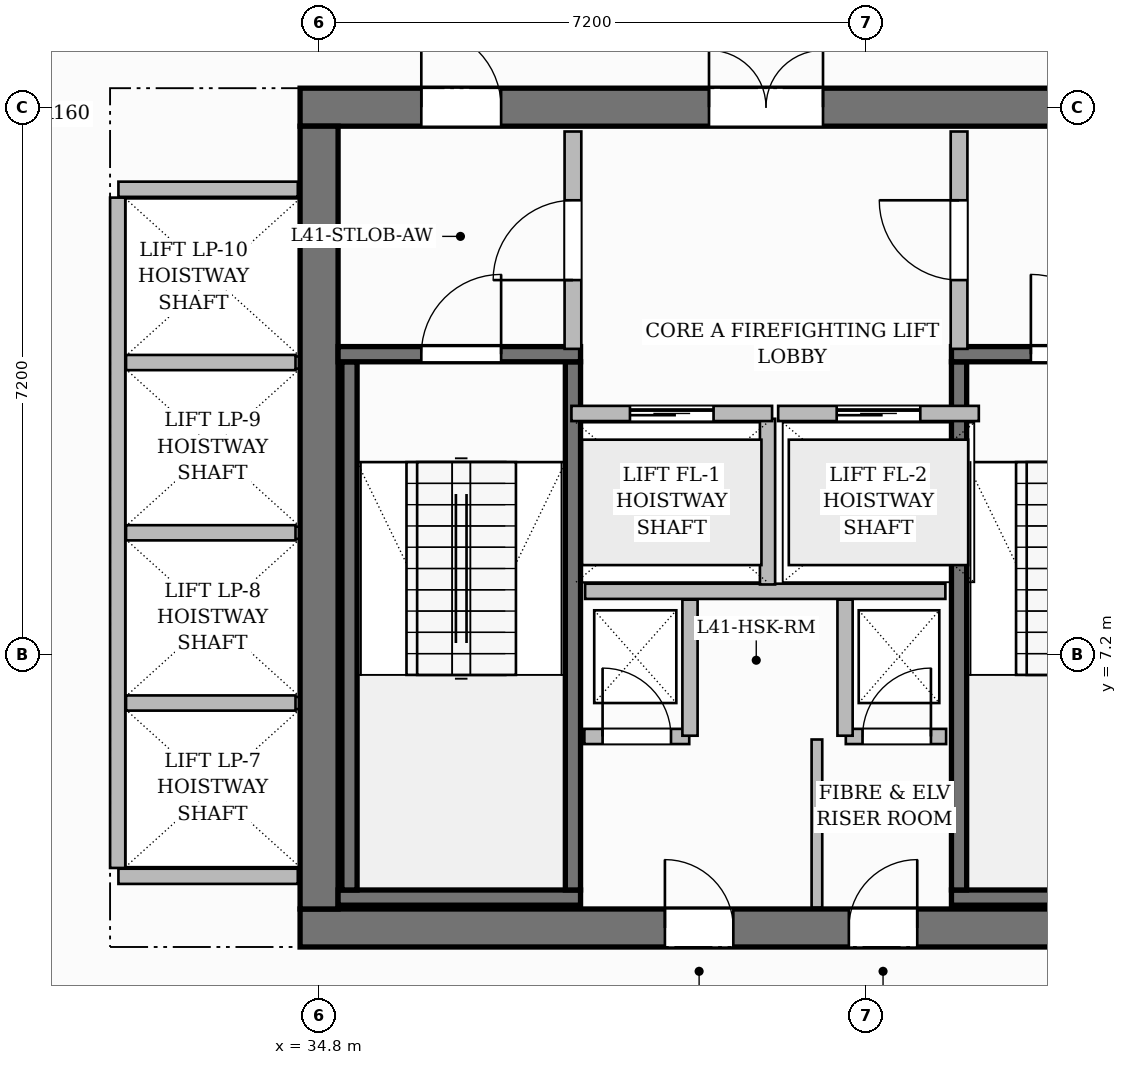
"""IFC4 building model, lengths in metres.
Left out: names, types, materials, properties, quantities, classifications, styles, units other than length and angle.
Written with IfcOpenShell. Run it as: python <this file> out.ifc"""

import sys

from ifc_helpers import new_model, si_unit, direction, frame, frame_2d, origin, place, context, subcontext, project, spatial, rectangle, extrude, source, transform, mapped, element, fill, save


model = new_model("IFC4")
c1 = context("Model", 3, precision=1e-05, world=origin(), true_north=direction((0.0, 1.0)))
c2 = subcontext(c1, "Body", "Model", "MODEL_VIEW")
j1 = project(units=[si_unit("LENGTHUNIT", "METRE"), si_unit("PLANEANGLEUNIT", "RADIAN")], contexts=[c1])
p1 = place(None, origin())
s1 = spatial("IfcSite", under=j1, at=p1, CompositionType="ELEMENT")
p2 = place(p1, origin())
s2 = spatial("IfcBuilding", under=s1, at=p2, CompositionType="ELEMENT")
p3 = place(p2, frame((0.0, 0.0, 165.7)))
s3 = spatial("IfcBuildingStorey", under=s2, at=p3, CompositionType="ELEMENT", Elevation=165.7)
p4 = place(p3, frame((34.55, 3.6, 0.0), z_axis=(0.0, 0.0, 1.0), x_axis=(1.0, 0.0, 0.0)))
e1 = element("IfcWall", 1, at=p4, inside=s3, PredefinedType="SHEAR", context=c2, shape_type="SweptSolid", body=[
    extrude(rectangle(XDim=15.5, YDim=0.5, at=frame_2d((7.75, 0.0))), origin(), (0.0, 0.0, 1.0), 3.85),
])
p5 = place(p4, frame((4.8, 0.0, 0.0)))
e2 = element("IfcOpeningElement", 2, at=p5, cuts=e1, PredefinedType="OPENING", context=c2, shape_type="SweptSolid", body=[
    extrude(rectangle(XDim=0.9, YDim=2.1, at=frame_2d((0.45, 1.05))), frame((0.0, 0.26, 0.0), z_axis=(0.0, -1.0, 0.0), x_axis=(1.0, 0.0, 0.0)), (0.0, 0.0, 1.0), 0.52),
])
p6 = place(p4, frame((7.22, 0.0, 0.0)))
e3 = element("IfcOpeningElement", 3, at=p6, cuts=e1, PredefinedType="OPENING", context=c2, shape_type="SweptSolid", body=[
    extrude(rectangle(XDim=0.9, YDim=2.1, at=frame_2d((0.45, 1.05))), frame((0.0, 0.26, 0.0), z_axis=(0.0, -1.0, 0.0), x_axis=(1.0, 0.0, 0.0)), (0.0, 0.0, 1.0), 0.52),
])
p7 = place(p3, frame((34.55, 14.4, 0.0), z_axis=(0.0, 0.0, 1.0), x_axis=(1.0, 0.0, 0.0)))
e4 = element("IfcWall", 4, at=p7, inside=s3, PredefinedType="SHEAR", context=c2, shape_type="SweptSolid", body=[
    extrude(rectangle(XDim=15.5, YDim=0.5, at=frame_2d((7.75, 0.0))), origin(), (0.0, 0.0, 1.0), 3.85),
])
p8 = place(p7, frame((5.38, 0.0, 0.0)))
e5 = element("IfcOpeningElement", 5, at=p8, cuts=e4, PredefinedType="OPENING", context=c2, shape_type="SweptSolid", body=[
    extrude(rectangle(XDim=1.5, YDim=2.2, at=frame_2d((0.75, 1.1))), frame((0.0, 0.26, 0.0), z_axis=(0.0, -1.0, 0.0), x_axis=(1.0, 0.0, 0.0)), (0.0, 0.0, 1.0), 0.52),
])
p9 = place(p7, frame((1.595, 0.0, 0.0)))
e6 = element("IfcOpeningElement", 6, at=p9, cuts=e4, PredefinedType="OPENING", context=c2, shape_type="SweptSolid", body=[
    extrude(rectangle(XDim=1.05, YDim=2.15, at=frame_2d((0.525, 1.075))), frame((0.0, 0.26, 0.0), z_axis=(0.0, -1.0, 0.0), x_axis=(1.0, 0.0, 0.0)), (0.0, 0.0, 1.0), 0.52),
])
p10 = place(p7, frame((11.225, 0.0, 0.0)))
e7 = element("IfcOpeningElement", 7, at=p10, cuts=e4, PredefinedType="OPENING", context=c2, shape_type="SweptSolid", body=[
    extrude(rectangle(XDim=1.05, YDim=2.15, at=frame_2d((0.525, 1.075))), frame((0.0, 0.26, 0.0), z_axis=(0.0, -1.0, 0.0), x_axis=(1.0, 0.0, 0.0)), (0.0, 0.0, 1.0), 0.52),
])
p11 = place(p3, frame((34.8, 3.85, 0.0), z_axis=(0.0, 0.0, 1.0), x_axis=(0.0, 1.0, 0.0)))
e8 = element("IfcWall", 8, at=p11, inside=s3, PredefinedType="SHEAR", context=c2, shape_type="SweptSolid", body=[
    extrude(rectangle(XDim=10.3, YDim=0.5, at=frame_2d((5.15, 0.0))), origin(), (0.0, 0.0, 1.0), 3.85),
])
p12 = place(p3, frame((35.05, 4.0, 0.0), z_axis=(0.0, 0.0, 1.0), x_axis=(1.0, 0.0, 0.0)))
e9 = element("IfcWall", 9, at=p12, inside=s3, PredefinedType="SHEAR", context=c2, shape_type="SweptSolid", body=[
    extrude(rectangle(XDim=3.19, YDim=0.2, at=frame_2d((1.595, 0.0))), origin(), (0.0, 0.0, 1.0), 3.85),
])
for number, where, z_axis, x_axis in (
    (10, (35.2, 4.1, 0.0), (0.0, 0.0, 1.0), (0.0, 1.0, 0.0)),
    (11, (38.14, 4.1, 0.0), (0.0, 0.0, 1.0), (0.0, 1.0, 0.0)),
):
    element("IfcWall", number, at=place(p3, frame(where, z_axis=z_axis, x_axis=x_axis)), inside=s3, PredefinedType="SHEAR", context=c2, shape_type="SweptSolid", body=[
        extrude(rectangle(XDim=6.95, YDim=0.2, at=frame_2d((3.475, 0.0))), origin(), (0.0, 0.0, 1.0), 3.85),
    ])
p13 = place(p3, frame((35.05, 11.15, 0.0), z_axis=(0.0, 0.0, 1.0), x_axis=(1.0, 0.0, 0.0)))
e12 = element("IfcWall", 12, at=p13, inside=s3, PredefinedType="SHEAR", context=c2, shape_type="SweptSolid", body=[
    extrude(rectangle(XDim=3.19, YDim=0.2, at=frame_2d((1.595, 0.0))), origin(), (0.0, 0.0, 1.0), 3.85),
])
p14 = place(p13, frame((1.095, 0.0, 0.0)))
e13 = element("IfcOpeningElement", 13, at=p14, cuts=e12, PredefinedType="OPENING", context=c2, shape_type="SweptSolid", body=[
    extrude(rectangle(XDim=1.05, YDim=2.2, at=frame_2d((0.525, 1.1))), frame((0.0, 0.11, 0.0), z_axis=(0.0, -1.0, 0.0), x_axis=(1.0, 0.0, 0.0)), (0.0, 0.0, 1.0), 0.22),
])
p15 = place(p3, frame((43.12, 4.0, 0.0), z_axis=(0.0, 0.0, 1.0), x_axis=(1.0, 0.0, 0.0)))
e14 = element("IfcWall", 14, at=p15, inside=s3, PredefinedType="SHEAR", context=c2, shape_type="SweptSolid", body=[
    extrude(rectangle(XDim=6.43, YDim=0.2, at=frame_2d((3.215, 0.0))), origin(), (0.0, 0.0, 1.0), 3.85),
])
p16 = place(p3, frame((43.22, 4.1, 0.0), z_axis=(0.0, 0.0, 1.0), x_axis=(0.0, 1.0, 0.0)))
e15 = element("IfcWall", 15, at=p16, inside=s3, PredefinedType="SHEAR", context=c2, shape_type="SweptSolid", body=[
    extrude(rectangle(XDim=6.95, YDim=0.2, at=frame_2d((3.475, 0.0))), origin(), (0.0, 0.0, 1.0), 3.85),
])
p17 = place(p3, frame((43.12, 11.15, 0.0), z_axis=(0.0, 0.0, 1.0), x_axis=(1.0, 0.0, 0.0)))
e16 = element("IfcWall", 16, at=p17, inside=s3, PredefinedType="SHEAR", context=c2, shape_type="SweptSolid", body=[
    extrude(rectangle(XDim=6.43, YDim=0.2, at=frame_2d((3.215, 0.0))), origin(), (0.0, 0.0, 1.0), 3.85),
])
p18 = place(p17, frame((1.045, 0.0, 0.0)))
e17 = element("IfcOpeningElement", 17, at=p18, cuts=e16, PredefinedType="OPENING", context=c2, shape_type="SweptSolid", body=[
    extrude(rectangle(XDim=1.05, YDim=2.2, at=frame_2d((0.525, 1.1))), frame((0.0, 0.11, 0.0), z_axis=(0.0, -1.0, 0.0), x_axis=(1.0, 0.0, 0.0)), (0.0, 0.0, 1.0), 0.22),
])
p19 = place(p17, frame((4.125, 0.0, 0.0)))
e18 = element("IfcOpeningElement", 18, at=p19, cuts=e16, PredefinedType="OPENING", context=c2, shape_type="SweptSolid", body=[
    extrude(rectangle(XDim=1.05, YDim=2.2, at=frame_2d((0.525, 1.1))), frame((0.0, 0.11, 0.0), z_axis=(0.0, -1.0, 0.0), x_axis=(1.0, 0.0, 0.0)), (0.0, 0.0, 1.0), 0.22),
])
p20 = place(p3, frame((38.3, 8.03, 0.0), z_axis=(0.0, 0.0, 1.0), x_axis=(1.0, 0.0, 0.0)))
e19 = element("IfcWall", 19, at=p20, inside=s3, PredefinedType="PARTITIONING", context=c2, shape_type="SweptSolid", body=[
    extrude(rectangle(XDim=4.74, YDim=0.2, at=frame_2d((2.37, 0.0))), origin(), (0.0, 0.0, 1.0), 3.6),
])
p21 = place(p3, frame((40.7, 8.12, 0.0), z_axis=(0.0, 0.0, 1.0), x_axis=(0.0, 1.0, 0.0)))
e20 = element("IfcWall", 20, at=p21, inside=s3, PredefinedType="PARTITIONING", context=c2, shape_type="SweptSolid", body=[
    extrude(rectangle(XDim=2.18, YDim=0.2, at=frame_2d((1.09, 0.0))), origin(), (0.0, 0.0, 1.0), 3.6),
])
p22 = place(p3, frame((38.14, 11.22, 0.0), z_axis=(0.0, 0.0, 1.0), x_axis=(0.0, 1.0, 0.0)))
e21 = element("IfcWall", 21, at=p22, inside=s3, PredefinedType="PARTITIONING", context=c2, shape_type="SweptSolid", body=[
    extrude(rectangle(XDim=2.86, YDim=0.22, at=frame_2d((1.43, 0.0))), origin(), (0.0, 0.0, 1.0), 3.6),
])
p23 = place(p22, frame((0.905, 0.0, 0.0)))
e22 = element("IfcOpeningElement", 22, at=p23, cuts=e21, PredefinedType="OPENING", context=c2, shape_type="SweptSolid", body=[
    extrude(rectangle(XDim=1.05, YDim=2.15, at=frame_2d((0.525, 1.075))), frame((0.0, 0.12, 0.0), z_axis=(0.0, -1.0, 0.0), x_axis=(1.0, 0.0, 0.0)), (0.0, 0.0, 1.0), 0.24),
])
p24 = place(p3, frame((43.22, 11.22, 0.0), z_axis=(0.0, 0.0, 1.0), x_axis=(0.0, 1.0, 0.0)))
e23 = element("IfcWall", 23, at=p24, inside=s3, PredefinedType="PARTITIONING", context=c2, shape_type="SweptSolid", body=[
    extrude(rectangle(XDim=2.86, YDim=0.22, at=frame_2d((1.43, 0.0))), origin(), (0.0, 0.0, 1.0), 3.6),
])
p25 = place(p24, frame((0.905, 0.0, 0.0)))
e24 = element("IfcOpeningElement", 24, at=p25, cuts=e23, PredefinedType="OPENING", context=c2, shape_type="SweptSolid", body=[
    extrude(rectangle(XDim=1.05, YDim=2.15, at=frame_2d((0.525, 1.075))), frame((0.0, 0.12, 0.0), z_axis=(0.0, -1.0, 0.0), x_axis=(1.0, 0.0, 0.0)), (0.0, 0.0, 1.0), 0.24),
])
p26 = place(p3, frame((38.29, 6.12, 0.0), z_axis=(0.0, 0.0, 1.0), x_axis=(1.0, 0.0, 0.0)))
e25 = element("IfcWall", 25, at=p26, inside=s3, PredefinedType="PARTITIONING", context=c2, shape_type="SweptSolid", body=[
    extrude(rectangle(XDim=1.38, YDim=0.2, at=frame_2d((0.69, 0.0))), origin(), (0.0, 0.0, 1.0), 3.6),
])
p27 = place(p26, frame((0.24, 0.0, 0.0)))
e26 = element("IfcOpeningElement", 26, at=p27, cuts=e25, PredefinedType="OPENING", context=c2, shape_type="SweptSolid", body=[
    extrude(rectangle(XDim=0.9, YDim=2.1, at=frame_2d((0.45, 1.05))), frame((0.0, 0.11, 0.0), z_axis=(0.0, -1.0, 0.0), x_axis=(1.0, 0.0, 0.0)), (0.0, 0.0, 1.0), 0.22),
])
p28 = place(p3, frame((39.68, 6.13, 0.0), z_axis=(0.0, 0.0, 1.0), x_axis=(0.0, 1.0, 0.0)))
e27 = element("IfcWall", 27, at=p28, inside=s3, PredefinedType="PARTITIONING", context=c2, shape_type="SweptSolid", body=[
    extrude(rectangle(XDim=1.79, YDim=0.2, at=frame_2d((0.895, 0.0))), origin(), (0.0, 0.0, 1.0), 3.6),
])
p29 = place(p3, frame((41.73, 6.12, 0.0), z_axis=(0.0, 0.0, 1.0), x_axis=(1.0, 0.0, 0.0)))
e28 = element("IfcWall", 28, at=p29, inside=s3, PredefinedType="PARTITIONING", context=c2, shape_type="SweptSolid", body=[
    extrude(rectangle(XDim=1.32, YDim=0.2, at=frame_2d((0.66, 0.0))), origin(), (0.0, 0.0, 1.0), 3.6),
])
p30 = place(p29, frame((0.22, 0.0, 0.0)))
e29 = element("IfcOpeningElement", 29, at=p30, cuts=e28, PredefinedType="OPENING", context=c2, shape_type="SweptSolid", body=[
    extrude(rectangle(XDim=0.9, YDim=2.1, at=frame_2d((0.45, 1.05))), frame((0.0, 0.11, 0.0), z_axis=(0.0, -1.0, 0.0), x_axis=(1.0, 0.0, 0.0)), (0.0, 0.0, 1.0), 0.22),
])
p31 = place(p3, frame((41.72, 6.13, 0.0), z_axis=(0.0, 0.0, 1.0), x_axis=(0.0, 1.0, 0.0)))
e30 = element("IfcWall", 30, at=p31, inside=s3, PredefinedType="PARTITIONING", context=c2, shape_type="SweptSolid", body=[
    extrude(rectangle(XDim=1.79, YDim=0.2, at=frame_2d((0.895, 0.0))), origin(), (0.0, 0.0, 1.0), 3.6),
])
p32 = place(p3, frame((41.35, 3.87, 0.0), z_axis=(0.0, 0.0, 1.0), x_axis=(0.0, 1.0, 0.0)))
e31 = element("IfcWall", 31, at=p32, inside=s3, PredefinedType="PARTITIONING", context=c2, shape_type="SweptSolid", body=[
    extrude(rectangle(XDim=2.21, YDim=0.14, at=frame_2d((1.105, 0.0))), origin(), (0.0, 0.0, 1.0), 3.6),
])
for number, where, z_axis, x_axis in (
    (32, (32.16, 4.28, 0.0), (0.0, 0.0, 1.0), (1.0, 0.0, 0.0)),
    (33, (32.16, 13.32, 0.0), (0.0, 0.0, 1.0), (1.0, 0.0, 0.0)),
):
    element("IfcWall", number, at=place(p3, frame(where, z_axis=z_axis, x_axis=x_axis)), inside=s3, PredefinedType="PARTITIONING", context=c2, shape_type="SweptSolid", body=[
        extrude(rectangle(XDim=2.36, YDim=0.2, at=frame_2d((1.18, 0.0))), origin(), (0.0, 0.0, 1.0), 3.6),
    ])
p33 = place(p3, frame((32.15, 4.39, 0.0), z_axis=(0.0, 0.0, 1.0), x_axis=(0.0, 1.0, 0.0)))
e34 = element("IfcWall", 34, at=p33, inside=s3, PredefinedType="PARTITIONING", context=c2, shape_type="SweptSolid", body=[
    extrude(rectangle(XDim=8.82, YDim=0.2, at=frame_2d((4.41, 0.0))), origin(), (0.0, 0.0, 1.0), 3.6),
])
for number, where, z_axis, x_axis in (
    (35, (32.26, 6.56, 0.0), (0.0, 0.0, 1.0), (1.0, 0.0, 0.0)),
    (36, (32.26, 8.8, 0.0), (0.0, 0.0, 1.0), (1.0, 0.0, 0.0)),
    (37, (32.26, 11.04, 0.0), (0.0, 0.0, 1.0), (1.0, 0.0, 0.0)),
):
    element("IfcWall", number, at=place(p3, frame(where, z_axis=z_axis, x_axis=x_axis)), inside=s3, PredefinedType="PARTITIONING", context=c2, shape_type="SweptSolid", body=[
        extrude(rectangle(XDim=2.23, YDim=0.2, at=frame_2d((1.115, 0.0))), origin(), (0.0, 0.0, 1.0), 3.6),
    ])
p34 = place(p3, frame((38.12, 10.37, 0.0), z_axis=(0.0, 0.0, 1.0), x_axis=(1.0, 0.0, 0.0)))
e38 = element("IfcWall", 38, at=p34, inside=s3, PredefinedType="PARTITIONING", context=c2, shape_type="SweptSolid", body=[
    extrude(rectangle(XDim=2.64, YDim=0.2, at=frame_2d((1.32, 0.0))), origin(), (0.0, 0.0, 1.0), 3.6),
])
p35 = place(p34, frame((0.77, 0.0, 0.0)))
e39 = element("IfcOpeningElement", 39, at=p35, cuts=e38, PredefinedType="OPENING", context=c2, shape_type="SweptSolid", body=[
    extrude(rectangle(XDim=1.1, YDim=2.2, at=frame_2d((0.55, 1.1))), frame((0.0, 0.11, 0.0), z_axis=(0.0, -1.0, 0.0), x_axis=(1.0, 0.0, 0.0)), (0.0, 0.0, 1.0), 0.22),
])
p36 = place(p3, frame((40.84, 10.37, 0.0), z_axis=(0.0, 0.0, 1.0), x_axis=(1.0, 0.0, 0.0)))
e40 = element("IfcWall", 40, at=p36, inside=s3, PredefinedType="PARTITIONING", context=c2, shape_type="SweptSolid", body=[
    extrude(rectangle(XDim=2.64, YDim=0.2, at=frame_2d((1.32, 0.0))), origin(), (0.0, 0.0, 1.0), 3.6),
])
p37 = place(p36, frame((0.77, 0.0, 0.0)))
e41 = element("IfcOpeningElement", 41, at=p37, cuts=e40, PredefinedType="OPENING", context=c2, shape_type="SweptSolid", body=[
    extrude(rectangle(XDim=1.1, YDim=2.2, at=frame_2d((0.55, 1.1))), frame((0.0, 0.11, 0.0), z_axis=(0.0, -1.0, 0.0), x_axis=(1.0, 0.0, 0.0)), (0.0, 0.0, 1.0), 0.22),
])
m1 = source(origin(), c2, "Body", "SweptSolid", [
    extrude(rectangle(XDim=1.05, YDim=2.2, at=frame_2d((0.525, 1.1))), frame((0.0, 0.025, 0.0), z_axis=(0.0, -1.0, 0.0), x_axis=(1.0, 0.0, 0.0)), (0.0, 0.0, 1.0), 0.05),
])
p38 = place(p14, origin())
e42 = element("IfcDoor", 42, at=p38, inside=s3, OperationType="SINGLE_SWING_RIGHT", PredefinedType="DOOR", context=c2, shape_type="MappedRepresentation", body=[
    mapped(m1, transform((0.0, 0.0, 0.0), scale=1.0)),
])
fill(e13, e42)
p39 = place(p18, origin())
e43 = element("IfcDoor", 43, at=p39, inside=s3, OperationType="SINGLE_SWING_LEFT", PredefinedType="DOOR", context=c2, shape_type="MappedRepresentation", body=[
    mapped(m1, transform((0.0, 0.0, 0.0), scale=1.0)),
])
fill(e17, e43)
m2 = source(origin(), c2, "Body", "SweptSolid", [
    extrude(rectangle(XDim=1.05, YDim=2.15, at=frame_2d((0.525, 1.075))), frame((0.0, 0.025, 0.0), z_axis=(0.0, -1.0, 0.0), x_axis=(1.0, 0.0, 0.0)), (0.0, 0.0, 1.0), 0.05),
])
p40 = place(p23, origin())
e44 = element("IfcDoor", 44, at=p40, inside=s3, OperationType="SINGLE_SWING_LEFT", PredefinedType="DOOR", context=c2, shape_type="MappedRepresentation", body=[
    mapped(m2, transform((0.0, 0.0, 0.0), scale=1.0)),
])
fill(e22, e44)
p41 = place(p25, origin())
e45 = element("IfcDoor", 45, at=p41, inside=s3, OperationType="SINGLE_SWING_RIGHT", PredefinedType="DOOR", context=c2, shape_type="MappedRepresentation", body=[
    mapped(m2, transform((0.0, 0.0, 0.0), scale=1.0)),
])
fill(e24, e45)
m3 = source(origin(), c2, "Body", "SweptSolid", [
    extrude(rectangle(XDim=1.5, YDim=2.2, at=frame_2d((0.75, 1.1))), frame((0.0, 0.025, 0.0), z_axis=(0.0, -1.0, 0.0), x_axis=(1.0, 0.0, 0.0)), (0.0, 0.0, 1.0), 0.05),
])
p42 = place(p8, origin())
e46 = element("IfcDoor", 46, at=p42, inside=s3, OperationType="DOUBLE_DOOR_SINGLE_SWING", PredefinedType="DOOR", context=c2, shape_type="MappedRepresentation", body=[
    mapped(m3, transform((0.0, 0.0, 0.0), scale=1.0)),
])
fill(e5, e46)
p43 = place(p9, origin())
e47 = element("IfcDoor", 47, at=p43, inside=s3, OperationType="SINGLE_SWING_LEFT", PredefinedType="DOOR", context=c2, shape_type="MappedRepresentation", body=[
    mapped(m2, transform((0.0, 0.0, 0.0), scale=1.0)),
])
fill(e6, e47)
m4 = source(origin(), c2, "Body", "SweptSolid", [
    extrude(rectangle(XDim=0.9, YDim=2.1, at=frame_2d((0.45, 1.05))), frame((0.0, 0.025, 0.0), z_axis=(0.0, -1.0, 0.0), x_axis=(1.0, 0.0, 0.0)), (0.0, 0.0, 1.0), 0.05),
])
p44 = place(p27, origin())
e48 = element("IfcDoor", 48, at=p44, inside=s3, OperationType="SINGLE_SWING_LEFT", PredefinedType="DOOR", context=c2, shape_type="MappedRepresentation", body=[
    mapped(m4, transform((0.0, 0.0, 0.0), scale=1.0)),
])
fill(e26, e48)
p45 = place(p30, origin())
e49 = element("IfcDoor", 49, at=p45, inside=s3, OperationType="SINGLE_SWING_RIGHT", PredefinedType="DOOR", context=c2, shape_type="MappedRepresentation", body=[
    mapped(m4, transform((0.0, 0.0, 0.0), scale=1.0)),
])
fill(e29, e49)
p46 = place(p5, origin())
e50 = element("IfcDoor", 50, at=p46, inside=s3, OperationType="SINGLE_SWING_LEFT", PredefinedType="DOOR", context=c2, shape_type="MappedRepresentation", body=[
    mapped(m4, transform((0.0, 0.0, 0.0), scale=1.0)),
])
fill(e2, e50)
p47 = place(p6, origin())
e51 = element("IfcDoor", 51, at=p47, inside=s3, OperationType="SINGLE_SWING_RIGHT", PredefinedType="DOOR", context=c2, shape_type="MappedRepresentation", body=[
    mapped(m4, transform((0.0, 0.0, 0.0), scale=1.0)),
])
fill(e3, e51)
m5 = source(origin(), c2, "Body", "SweptSolid", [
    extrude(rectangle(XDim=1.1, YDim=2.2, at=frame_2d((0.55, 1.1))), frame((0.0, 0.025, 0.0), z_axis=(0.0, -1.0, 0.0), x_axis=(1.0, 0.0, 0.0)), (0.0, 0.0, 1.0), 0.05),
])
p48 = place(p35, origin())
e52 = element("IfcDoor", 52, at=p48, inside=s3, OperationType="SLIDING_TO_LEFT", PredefinedType="DOOR", context=c2, shape_type="MappedRepresentation", body=[
    mapped(m5, transform((0.0, 0.0, 0.0), scale=1.0)),
])
fill(e39, e52)
p49 = place(p37, origin())
e53 = element("IfcDoor", 53, at=p49, inside=s3, OperationType="SLIDING_TO_LEFT", PredefinedType="DOOR", context=c2, shape_type="MappedRepresentation", body=[
    mapped(m5, transform((0.0, 0.0, 0.0), scale=1.0)),
])
fill(e41, e53)
save(model, sys.argv[1])
